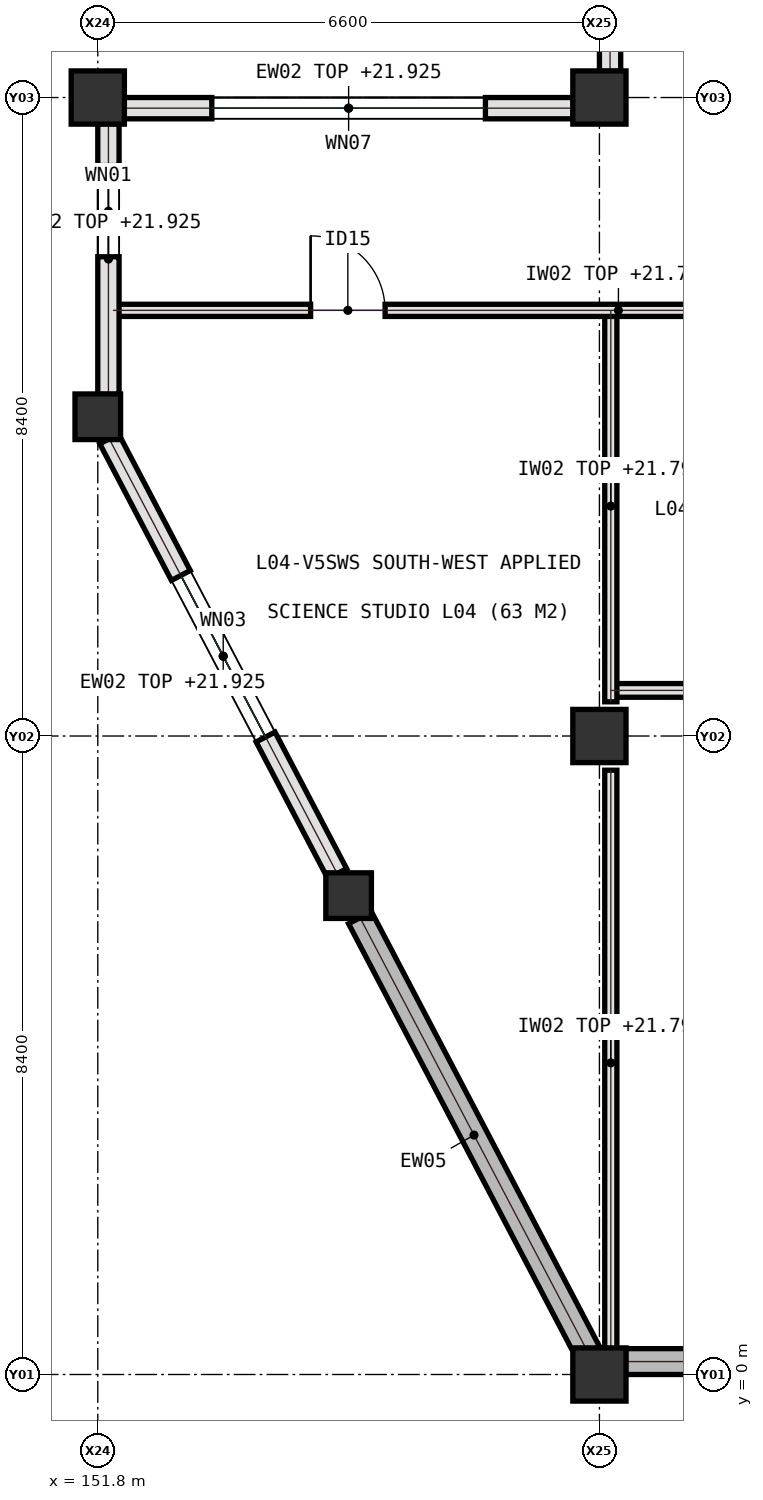
"""IFC4 building model, lengths in metres.
Left out: names, types, materials, properties, quantities, classifications, styles, units other than length and angle.
Written with IfcOpenShell. Run it as: python <this file> out.ifc"""

import sys

from ifc_helpers import new_model, si_unit, direction, frame, frame_2d, origin, origin_2d, place, context, subcontext, project, spatial, rectangle, extrude, element, fill, save


model = new_model("IFC4")
c1 = context("Model", 3, precision=1e-05, world=origin(), true_north=direction((0.0, 1.0)))
c2 = subcontext(c1, "Body", "Model", "MODEL_VIEW")
j1 = project(units=[si_unit("LENGTHUNIT", "METRE"), si_unit("PLANEANGLEUNIT", "RADIAN")], contexts=[c1])
p1 = place(None, origin())
s1 = spatial("IfcSite", under=j1, at=p1, CompositionType="ELEMENT")
p2 = place(p1, origin())
s2 = spatial("IfcBuilding", under=s1, at=p2, CompositionType="ELEMENT")
p3 = place(p2, frame((0.0, 0.0, 18.6)))
s3 = spatial("IfcBuildingStorey", under=s2, at=p3, CompositionType="ELEMENT", Elevation=18.6)
for number, where, z_axis, x_axis in (
    (1, (151.8, 16.8, 0.0), (0.0, 0.0, 1.0), (1.0, 0.0, 0.0)),
    (2, (158.4, 0.0, 0.0), (0.0, 0.0, 1.0), (1.0, 0.0, 0.0)),
    (3, (158.4, 8.4, 0.0), (0.0, 0.0, 1.0), (1.0, 0.0, 0.0)),
    (4, (158.4, 16.8, 0.0), (0.0, 0.0, 1.0), (1.0, 0.0, 0.0)),
):
    element("IfcColumn", number, at=place(p3, frame(where, z_axis=z_axis, x_axis=x_axis)), inside=s3, PredefinedType="COLUMN", context=c2, shape_type="SweptSolid", body=[
        extrude(rectangle(XDim=0.7, YDim=0.7, at=origin_2d()), origin(), (0.0, 0.0, 1.0), 4.2),
    ])
for number, where, z_axis, x_axis in (
    (5, (151.8, 12.6, 0.0), (0.0, 0.0, 1.0), (1.0, 0.0, 0.0)),
    (6, (155.1, 6.3, 0.0), (0.0, 0.0, 1.0), (1.0, 0.0, 0.0)),
):
    element("IfcColumn", number, at=place(p3, frame(where, z_axis=z_axis, x_axis=x_axis)), inside=s3, PredefinedType="COLUMN", context=c2, shape_type="SweptSolid", body=[
        extrude(rectangle(XDim=0.6, YDim=0.6, at=origin_2d()), origin(), (0.0, 0.0, 1.0), 4.2),
    ])
p4 = place(p3, frame((158.55, 9.0, 0.0), z_axis=(0.0, 0.0, 1.0), x_axis=(1.0, 0.0, 0.0)))
e7 = element("IfcWall", 7, at=p4, inside=s3, PredefinedType="SOLIDWALL", context=c2, shape_type="SweptSolid", body=[
    extrude(rectangle(XDim=6.75, YDim=0.18, at=frame_2d((3.375, 0.0))), origin(), (0.0, 0.0, 1.0), 3.19),
])
p5 = place(p4, frame((2.5, 0.0, 0.0)))
e8 = element("IfcOpeningElement", 8, at=p5, cuts=e7, PredefinedType="OPENING", context=c2, shape_type="SweptSolid", body=[
    extrude(rectangle(XDim=1.6, YDim=2.2, at=frame_2d((0.8, 1.1))), frame((0.0, 0.1, 0.0), z_axis=(0.0, -1.0, 0.0), x_axis=(1.0, 0.0, 0.0)), (0.0, 0.0, 1.0), 0.2),
])
p6 = place(p3, frame((158.55, 0.25, 0.0), z_axis=(0.0, 0.0, 1.0), x_axis=(0.0, 1.0, 0.0)))
e9 = element("IfcWall", 9, at=p6, inside=s3, PredefinedType="PARTITIONING", context=c2, shape_type="SweptSolid", body=[
    extrude(rectangle(XDim=7.7, YDim=0.16, at=frame_2d((3.85, 0.0))), origin(), (0.0, 0.0, 1.0), 3.19),
])
p7 = place(p3, frame((158.55, 8.85, 0.0), z_axis=(0.0, 0.0, 1.0), x_axis=(0.0, 1.0, 0.0)))
e10 = element("IfcWall", 10, at=p7, inside=s3, PredefinedType="PARTITIONING", context=c2, shape_type="SweptSolid", body=[
    extrude(rectangle(XDim=5.15, YDim=0.16, at=frame_2d((2.575, 0.0))), origin(), (0.0, 0.0, 1.0), 3.19),
])
p8 = place(p3, frame((152.0, 14.0, 0.0), z_axis=(0.0, 0.0, 1.0), x_axis=(1.0, 0.0, 0.0)))
e11 = element("IfcWall", 11, at=p8, inside=s3, PredefinedType="PARTITIONING", context=c2, shape_type="SweptSolid", body=[
    extrude(rectangle(XDim=13.3, YDim=0.16, at=frame_2d((6.65, 0.0))), origin(), (0.0, 0.0, 1.0), 3.19),
])
p9 = place(p8, frame((2.6, 0.0, 0.0)))
e12 = element("IfcOpeningElement", 12, at=p9, cuts=e11, PredefinedType="OPENING", context=c2, shape_type="SweptSolid", body=[
    extrude(rectangle(XDim=0.98, YDim=2.12, at=frame_2d((0.49, 1.06))), frame((0.0, 0.09, 0.0), z_axis=(0.0, -1.0, 0.0), x_axis=(1.0, 0.0, 0.0)), (0.0, 0.0, 1.0), 0.18),
])
p10 = place(p8, frame((9.8, 0.0, 0.0)))
e13 = element("IfcOpeningElement", 13, at=p10, cuts=e11, PredefinedType="OPENING", context=c2, shape_type="SweptSolid", body=[
    extrude(rectangle(XDim=0.98, YDim=2.12, at=frame_2d((0.49, 1.06))), frame((0.0, 0.09, 0.0), z_axis=(0.0, -1.0, 0.0), x_axis=(1.0, 0.0, 0.0)), (0.0, 0.0, 1.0), 0.18),
])
p11 = place(p3, frame((158.055, 16.66, 0.0), z_axis=(0.0, 0.0, 1.0), x_axis=(-1.0, 0.0, 0.0)))
e14 = element("IfcWall", 14, at=p11, inside=s3, PredefinedType="SOLIDWALL", context=c2, shape_type="SweptSolid", body=[
    extrude(rectangle(XDim=5.91, YDim=0.28, at=frame_2d((2.955, 0.0))), origin(), (0.0, 0.0, 1.0), 3.325),
])
p12 = place(p11, frame((1.155, 0.0, 0.95)))
e15 = element("IfcOpeningElement", 15, at=p12, cuts=e14, PredefinedType="OPENING", context=c2, shape_type="SweptSolid", body=[
    extrude(rectangle(XDim=3.6, YDim=2.0, at=frame_2d((1.8, 1.0))), frame((0.0, 0.15, 0.0), z_axis=(0.0, -1.0, 0.0), x_axis=(1.0, 0.0, 0.0)), (0.0, 0.0, 1.0), 0.3),
])
p13 = place(p3, frame((158.745, 0.17, 0.0), z_axis=(0.0, 0.0, 1.0), x_axis=(1.0, 0.0, 0.0)))
e16 = element("IfcWall", 16, at=p13, inside=s3, PredefinedType="SHEAR", context=c2, shape_type="SweptSolid", body=[
    extrude(rectangle(XDim=5.91, YDim=0.34, at=frame_2d((2.955, 0.0))), origin(), (0.0, 0.0, 1.0), 3.94),
])
p14 = place(p3, frame((158.54, 24.855, 0.0), z_axis=(0.0, 0.0, 1.0), x_axis=(0.0, -1.0, 0.0)))
e17 = element("IfcWall", 17, at=p14, inside=s3, PredefinedType="SOLIDWALL", context=c2, shape_type="SweptSolid", body=[
    extrude(rectangle(XDim=7.71, YDim=0.28, at=frame_2d((3.855, 0.0))), origin(), (0.0, 0.0, 1.0), 3.325),
])
p15 = place(p14, frame((2.505, 0.0, 0.95)))
e18 = element("IfcOpeningElement", 18, at=p15, cuts=e17, PredefinedType="OPENING", context=c2, shape_type="SweptSolid", body=[
    extrude(rectangle(XDim=2.7, YDim=2.05, at=frame_2d((1.35, 1.025))), frame((0.0, 0.15, 0.0), z_axis=(0.0, -1.0, 0.0), x_axis=(1.0, 0.0, 0.0)), (0.0, 0.0, 1.0), 0.3),
])
p16 = place(p3, frame((151.94, 16.455, 0.0), z_axis=(0.0, 0.0, 1.0), x_axis=(0.0, -1.0, 0.0)))
e19 = element("IfcWall", 19, at=p16, inside=s3, PredefinedType="SOLIDWALL", context=c2, shape_type="SweptSolid", body=[
    extrude(rectangle(XDim=3.56, YDim=0.28, at=frame_2d((1.78, 0.0))), origin(), (0.0, 0.0, 1.0), 3.325),
])
p17 = place(p16, frame((0.55, 0.0, 0.95)))
e20 = element("IfcOpeningElement", 20, at=p17, cuts=e19, PredefinedType="OPENING", context=c2, shape_type="SweptSolid", body=[
    extrude(rectangle(XDim=1.2, YDim=1.5, at=frame_2d((0.6, 0.75))), frame((0.0, 0.15, 0.0), z_axis=(0.0, -1.0, 0.0), x_axis=(1.0, 0.0, 0.0)), (0.0, 0.0, 1.0), 0.3),
])
p18 = place(p3, frame((151.95, 12.31, 0.0), z_axis=(0.0, 0.0, 1.0), x_axis=(0.464471613901, -0.885588007981, 0.0)))
e21 = element("IfcWall", 21, at=p18, inside=s3, PredefinedType="SOLIDWALL", context=c2, shape_type="SweptSolid", body=[
    extrude(rectangle(XDim=6.459, YDim=0.28, at=frame_2d((3.229, 0.0))), origin(), (0.0, 0.0, 1.0), 3.325),
])
p19 = place(p18, frame((2.03, 0.0, 0.95)))
e22 = element("IfcOpeningElement", 22, at=p19, cuts=e21, PredefinedType="OPENING", context=c2, shape_type="SweptSolid", body=[
    extrude(rectangle(XDim=2.4, YDim=1.6, at=frame_2d((1.2, 0.8))), frame((0.0, 0.15, 0.0), z_axis=(0.0, -1.0, 0.0), x_axis=(1.0, 0.0, 0.0)), (0.0, 0.0, 1.0), 0.3),
])
p20 = place(p3, frame((155.25, 6.01, 0.0), z_axis=(0.0, 0.0, 1.0), x_axis=(0.464471613901, -0.885588007981, 0.0)))
e23 = element("IfcWall", 23, at=p20, inside=s3, PredefinedType="SHEAR", context=c2, shape_type="SweptSolid", body=[
    extrude(rectangle(XDim=6.459, YDim=0.34, at=frame_2d((3.229, 0.0))), origin(), (0.0, 0.0, 1.0), 3.94),
])
p21 = place(p9, origin())
e24 = element("IfcDoor", 24, at=p21, inside=s3, OperationType="SINGLE_SWING_LEFT", PredefinedType="DOOR", context=c2, shape_type="SweptSolid", body=[
    extrude(rectangle(XDim=0.98, YDim=2.12, at=frame_2d((0.49, 1.06))), frame((0.0, 0.025, 0.0), z_axis=(0.0, -1.0, 0.0), x_axis=(1.0, 0.0, 0.0)), (0.0, 0.0, 1.0), 0.05),
])
fill(e12, e24)
p22 = place(p12, origin())
e25 = element("IfcWindow", 25, at=p22, inside=s3, PartitioningType="SINGLE_PANEL", PredefinedType="WINDOW", context=c2, shape_type="SweptSolid", body=[
    extrude(rectangle(XDim=3.6, YDim=2.0, at=frame_2d((1.8, 1.0))), frame((0.0, 0.03, 0.0), z_axis=(0.0, -1.0, 0.0), x_axis=(1.0, 0.0, 0.0)), (0.0, 0.0, 1.0), 0.06),
])
fill(e15, e25)
p23 = place(p17, origin())
e26 = element("IfcWindow", 26, at=p23, inside=s3, PartitioningType="SINGLE_PANEL", PredefinedType="WINDOW", context=c2, shape_type="SweptSolid", body=[
    extrude(rectangle(XDim=1.2, YDim=1.5, at=frame_2d((0.6, 0.75))), frame((0.0, 0.03, 0.0), z_axis=(0.0, -1.0, 0.0), x_axis=(1.0, 0.0, 0.0)), (0.0, 0.0, 1.0), 0.06),
])
fill(e20, e26)
p24 = place(p19, origin())
e27 = element("IfcWindow", 27, at=p24, inside=s3, PartitioningType="SINGLE_PANEL", PredefinedType="WINDOW", context=c2, shape_type="SweptSolid", body=[
    extrude(rectangle(XDim=2.4, YDim=1.6, at=frame_2d((1.2, 0.8))), frame((0.0, 0.03, 0.0), z_axis=(0.0, -1.0, 0.0), x_axis=(1.0, 0.0, 0.0)), (0.0, 0.0, 1.0), 0.06),
])
fill(e22, e27)
save(model, sys.argv[1])
